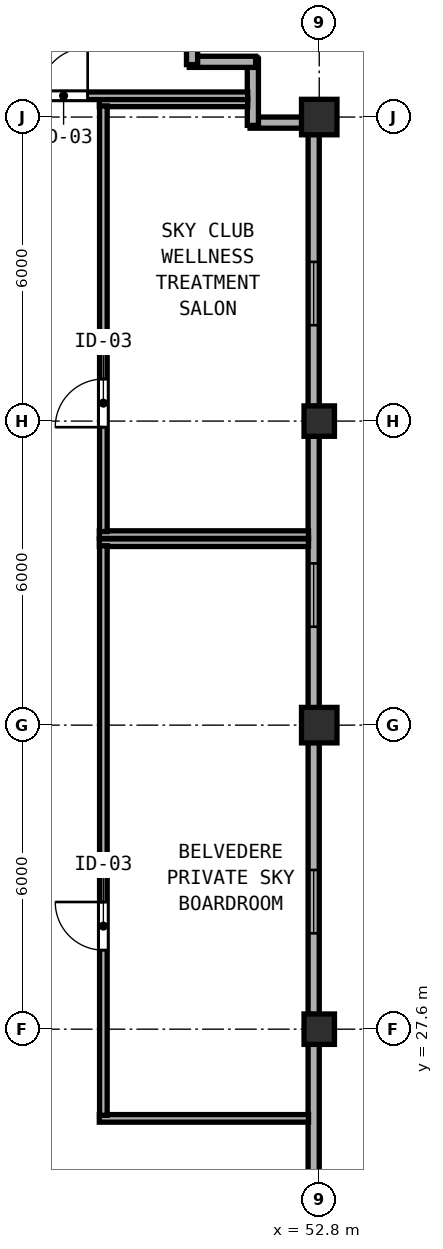
"""IFC4 building model, lengths in metres.
Left out: names, types, materials, properties, quantities, classifications, styles, units other than length and angle.
Written with IfcOpenShell. Run it as: python <this file> out.ifc"""

import sys

from ifc_helpers import new_model, si_unit, direction, frame, frame_2d, origin, origin_2d, place, context, subcontext, project, spatial, rectangle, hollow_rectangle, extrude, element, fill, save


model = new_model("IFC4")
c1 = context("Model", 3, precision=1e-05, world=origin(), true_north=direction((0.0, 1.0)))
c2 = subcontext(c1, "Body", "Model", "MODEL_VIEW")
j1 = project(units=[si_unit("LENGTHUNIT", "METRE"), si_unit("PLANEANGLEUNIT", "RADIAN")], contexts=[c1])
p1 = place(None, origin())
s1 = spatial("IfcSite", under=j1, at=p1, CompositionType="ELEMENT")
p2 = place(p1, origin())
s2 = spatial("IfcBuilding", under=s1, at=p2, CompositionType="ELEMENT")
p3 = place(p2, frame((0.0, 0.0, 305.6)))
s3 = spatial("IfcBuildingStorey", under=s2, at=p3, CompositionType="ELEMENT", Elevation=305.6)
for number, where, z_axis, x_axis in (
    (1, (52.8, 33.6, 0.0), (0.0, 0.0, 1.0), (1.0, 0.0, 0.0)),
    (2, (52.8, 45.6, 0.0), (0.0, 0.0, 1.0), (1.0, 0.0, 0.0)),
):
    element("IfcColumn", number, at=place(p3, frame(where, z_axis=z_axis, x_axis=x_axis)), inside=s3, PredefinedType="COLUMN", context=c2, shape_type="SweptSolid", body=[
        extrude(hollow_rectangle(XDim=0.7, YDim=0.7, WallThickness=0.026, at=origin_2d()), origin(), (0.0, 0.0, 1.0), 3.9),
    ])
for number, where, z_axis, x_axis in (
    (3, (52.8, 27.6, 0.0), (0.0, 0.0, 1.0), (1.0, 0.0, 0.0)),
    (4, (52.8, 39.6, 0.0), (0.0, 0.0, 1.0), (1.0, 0.0, 0.0)),
):
    element("IfcColumn", number, at=place(p3, frame(where, z_axis=z_axis, x_axis=x_axis)), inside=s3, PredefinedType="COLUMN", context=c2, shape_type="SweptSolid", body=[
        extrude(hollow_rectangle(XDim=0.6, YDim=0.6, WallThickness=0.024, at=origin_2d()), origin(), (0.0, 0.0, 1.0), 3.9),
    ])
p4 = place(p3, frame((52.69, 21.942, 0.0), z_axis=(0.0, 0.0, 1.0), x_axis=(0.0, 1.0, 0.0)))
e5 = element("IfcWall", 5, at=p4, inside=s3, PredefinedType="SOLIDWALL", context=c2, shape_type="SweptSolid", body=[
    extrude(rectangle(XDim=5.366, YDim=0.22, at=frame_2d((2.683, 0.0))), origin(), (0.0, 0.0, 1.0), 3.365),
])
p5 = place(p4, frame((0.973, 0.0, 0.85)))
e6 = element("IfcOpeningElement", 6, at=p5, cuts=e5, PredefinedType="OPENING", context=c2, shape_type="SweptSolid", body=[
    extrude(rectangle(XDim=1.25, YDim=1.95, at=frame_2d((0.625, 0.975))), frame((0.0, 0.12, 0.0), z_axis=(0.0, -1.0, 0.0), x_axis=(1.0, 0.0, 0.0)), (0.0, 0.0, 1.0), 0.24),
])
p6 = place(p3, frame((52.69, 27.892, 0.0), z_axis=(0.0, 0.0, 1.0), x_axis=(0.0, 1.0, 0.0)))
e7 = element("IfcWall", 7, at=p6, inside=s3, PredefinedType="SOLIDWALL", context=c2, shape_type="SweptSolid", body=[
    extrude(rectangle(XDim=5.366, YDim=0.22, at=frame_2d((2.683, 0.0))), origin(), (0.0, 0.0, 1.0), 3.365),
])
p7 = place(p6, frame((1.6, 0.0, 0.85)))
e8 = element("IfcOpeningElement", 8, at=p7, cuts=e7, PredefinedType="OPENING", context=c2, shape_type="SweptSolid", body=[
    extrude(rectangle(XDim=1.25, YDim=1.95, at=frame_2d((0.625, 0.975))), frame((0.0, 0.12, 0.0), z_axis=(0.0, -1.0, 0.0), x_axis=(1.0, 0.0, 0.0)), (0.0, 0.0, 1.0), 0.24),
])
p8 = place(p3, frame((52.69, 33.942, 0.0), z_axis=(0.0, 0.0, 1.0), x_axis=(0.0, 1.0, 0.0)))
e9 = element("IfcWall", 9, at=p8, inside=s3, PredefinedType="SOLIDWALL", context=c2, shape_type="SweptSolid", body=[
    extrude(rectangle(XDim=5.366, YDim=0.22, at=frame_2d((2.683, 0.0))), origin(), (0.0, 0.0, 1.0), 3.365),
])
p9 = place(p8, frame((1.6, 0.0, 0.85)))
e10 = element("IfcOpeningElement", 10, at=p9, cuts=e9, PredefinedType="OPENING", context=c2, shape_type="SweptSolid", body=[
    extrude(rectangle(XDim=1.25, YDim=1.95, at=frame_2d((0.625, 0.975))), frame((0.0, 0.12, 0.0), z_axis=(0.0, -1.0, 0.0), x_axis=(1.0, 0.0, 0.0)), (0.0, 0.0, 1.0), 0.24),
])
p10 = place(p3, frame((52.69, 39.892, 0.0), z_axis=(0.0, 0.0, 1.0), x_axis=(0.0, 1.0, 0.0)))
e11 = element("IfcWall", 11, at=p10, inside=s3, PredefinedType="SOLIDWALL", context=c2, shape_type="SweptSolid", body=[
    extrude(rectangle(XDim=5.366, YDim=0.22, at=frame_2d((2.683, 0.0))), origin(), (0.0, 0.0, 1.0), 3.365),
])
p11 = place(p10, frame((1.6, 0.0, 0.85)))
e12 = element("IfcOpeningElement", 12, at=p11, cuts=e11, PredefinedType="OPENING", context=c2, shape_type="SweptSolid", body=[
    extrude(rectangle(XDim=1.25, YDim=1.95, at=frame_2d((0.625, 0.975))), frame((0.0, 0.12, 0.0), z_axis=(0.0, -1.0, 0.0), x_axis=(1.0, 0.0, 0.0)), (0.0, 0.0, 1.0), 0.24),
])
p12 = place(p3, frame((52.458, 45.49, 0.0), z_axis=(0.0, 0.0, 1.0), x_axis=(-1.0, 0.0, 0.0)))
e13 = element("IfcWall", 13, at=p12, inside=s3, PredefinedType="SOLIDWALL", context=c2, shape_type="SweptSolid", body=[
    extrude(rectangle(XDim=1.023, YDim=0.22, at=frame_2d((0.511, 0.0))), origin(), (0.0, 0.0, 1.0), 3.72),
])
p13 = place(p3, frame((51.49, 45.435, 0.0), z_axis=(0.0, 0.0, 1.0), x_axis=(0.0, 1.0, 0.0)))
e14 = element("IfcWall", 14, at=p13, inside=s3, PredefinedType="SOLIDWALL", context=c2, shape_type="SweptSolid", body=[
    extrude(rectangle(XDim=1.31, YDim=0.22, at=frame_2d((0.655, 0.0))), origin(), (0.0, 0.0, 1.0), 3.72),
])
p14 = place(p3, frame((51.545, 46.69, 0.0), z_axis=(0.0, 0.0, 1.0), x_axis=(-1.0, 0.0, 0.0)))
e15 = element("IfcWall", 15, at=p14, inside=s3, PredefinedType="SOLIDWALL", context=c2, shape_type="SweptSolid", body=[
    extrude(rectangle(XDim=1.31, YDim=0.22, at=frame_2d((0.655, 0.0))), origin(), (0.0, 0.0, 1.0), 3.72),
])
p15 = place(p3, frame((50.29, 46.635, 0.0), z_axis=(0.0, 0.0, 1.0), x_axis=(0.0, 1.0, 0.0)))
e16 = element("IfcWall", 16, at=p15, inside=s3, PredefinedType="SOLIDWALL", context=c2, shape_type="SweptSolid", body=[
    extrude(rectangle(XDim=1.535, YDim=0.22, at=frame_2d((0.768, 0.0))), origin(), (0.0, 0.0, 1.0), 3.72),
])
for number, where, z_axis, x_axis in (
    (17, (48.46, 37.2, 0.0), (0.0, 0.0, 1.0), (1.0, 0.0, 0.0)),
    (18, (48.46, 25.84, 0.0), (0.0, 0.0, 1.0), (1.0, 0.0, 0.0)),
):
    element("IfcWall", number, at=place(p3, frame(where, z_axis=z_axis, x_axis=x_axis)), inside=s3, PredefinedType="PARTITIONING", context=c2, shape_type="SweptSolid", body=[
        extrude(rectangle(XDim=4.128, YDim=0.15, at=frame_2d((2.064, 0.0))), origin(), (0.0, 0.0, 1.0), 3.72),
    ])
p16 = place(p3, frame((48.54, 25.9, 0.0), z_axis=(0.0, 0.0, 1.0), x_axis=(0.0, 1.0, 0.0)))
e19 = element("IfcWall", 19, at=p16, inside=s3, PredefinedType="PARTITIONING", context=c2, shape_type="SweptSolid", body=[
    extrude(rectangle(XDim=11.24, YDim=0.15, at=frame_2d((5.62, 0.0))), origin(), (0.0, 0.0, 1.0), 3.72),
])
p17 = place(p16, frame((3.26, 0.0, 0.0)))
e20 = element("IfcOpeningElement", 20, at=p17, cuts=e19, PredefinedType="OPENING", context=c2, shape_type="SweptSolid", body=[
    extrude(rectangle(XDim=0.95, YDim=2.12, at=frame_2d((0.475, 1.06))), frame((0.0, 0.085, 0.0), z_axis=(0.0, -1.0, 0.0), x_axis=(1.0, 0.0, 0.0)), (0.0, 0.0, 1.0), 0.17),
])
p18 = place(p3, frame((48.46, 45.88, 0.0), z_axis=(0.0, 0.0, 1.0), x_axis=(1.0, 0.0, 0.0)))
e21 = element("IfcWall", 21, at=p18, inside=s3, PredefinedType="PARTITIONING", context=c2, shape_type="SweptSolid", body=[
    extrude(rectangle(XDim=2.928, YDim=0.15, at=frame_2d((1.464, 0.0))), origin(), (0.0, 0.0, 1.0), 3.72),
])
p19 = place(p3, frame((48.46, 37.36, 0.0), z_axis=(0.0, 0.0, 1.0), x_axis=(1.0, 0.0, 0.0)))
e22 = element("IfcWall", 22, at=p19, inside=s3, PredefinedType="PARTITIONING", context=c2, shape_type="SweptSolid", body=[
    extrude(rectangle(XDim=4.128, YDim=0.15, at=frame_2d((2.064, 0.0))), origin(), (0.0, 0.0, 1.0), 3.72),
])
p20 = place(p3, frame((48.54, 37.42, 0.0), z_axis=(0.0, 0.0, 1.0), x_axis=(0.0, 1.0, 0.0)))
e23 = element("IfcWall", 23, at=p20, inside=s3, PredefinedType="PARTITIONING", context=c2, shape_type="SweptSolid", body=[
    extrude(rectangle(XDim=8.4, YDim=0.15, at=frame_2d((4.2, 0.0))), origin(), (0.0, 0.0, 1.0), 3.72),
])
p21 = place(p20, frame((2.06, 0.0, 0.0)))
e24 = element("IfcOpeningElement", 24, at=p21, cuts=e23, PredefinedType="OPENING", context=c2, shape_type="SweptSolid", body=[
    extrude(rectangle(XDim=0.95, YDim=2.12, at=frame_2d((0.475, 1.06))), frame((0.0, 0.085, 0.0), z_axis=(0.0, -1.0, 0.0), x_axis=(1.0, 0.0, 0.0)), (0.0, 0.0, 1.0), 0.17),
])
p22 = place(p3, frame((45.385, 46.02, 0.0), z_axis=(0.0, 0.0, 1.0), x_axis=(1.0, 0.0, 0.0)))
e25 = element("IfcWall", 25, at=p22, inside=s3, PredefinedType="PARTITIONING", context=c2, shape_type="SweptSolid", body=[
    extrude(rectangle(XDim=6.003, YDim=0.15, at=frame_2d((3.001, 0.0))), origin(), (0.0, 0.0, 1.0), 3.72),
])
p23 = place(p22, frame((1.895, 0.0, 0.0)))
e26 = element("IfcOpeningElement", 26, at=p23, cuts=e25, PredefinedType="OPENING", context=c2, shape_type="SweptSolid", body=[
    extrude(rectangle(XDim=0.95, YDim=2.12, at=frame_2d((0.475, 1.06))), frame((0.0, 0.085, 0.0), z_axis=(0.0, -1.0, 0.0), x_axis=(1.0, 0.0, 0.0)), (0.0, 0.0, 1.0), 0.17),
])
p24 = place(p7, origin())
e27 = element("IfcWindow", 27, at=p24, inside=s3, PartitioningType="SINGLE_PANEL", PredefinedType="WINDOW", context=c2, shape_type="SweptSolid", body=[
    extrude(rectangle(XDim=1.25, YDim=1.95, at=frame_2d((0.625, 0.975))), frame((0.0, 0.03, 0.0), z_axis=(0.0, -1.0, 0.0), x_axis=(1.0, 0.0, 0.0)), (0.0, 0.0, 1.0), 0.06),
])
fill(e8, e27)
p25 = place(p9, origin())
e28 = element("IfcWindow", 28, at=p25, inside=s3, PartitioningType="SINGLE_PANEL", PredefinedType="WINDOW", context=c2, shape_type="SweptSolid", body=[
    extrude(rectangle(XDim=1.25, YDim=1.95, at=frame_2d((0.625, 0.975))), frame((0.0, 0.03, 0.0), z_axis=(0.0, -1.0, 0.0), x_axis=(1.0, 0.0, 0.0)), (0.0, 0.0, 1.0), 0.06),
])
fill(e10, e28)
p26 = place(p11, origin())
e29 = element("IfcWindow", 29, at=p26, inside=s3, PartitioningType="SINGLE_PANEL", PredefinedType="WINDOW", context=c2, shape_type="SweptSolid", body=[
    extrude(rectangle(XDim=1.25, YDim=1.95, at=frame_2d((0.625, 0.975))), frame((0.0, 0.03, 0.0), z_axis=(0.0, -1.0, 0.0), x_axis=(1.0, 0.0, 0.0)), (0.0, 0.0, 1.0), 0.06),
])
fill(e12, e29)
p27 = place(p17, origin())
e30 = element("IfcDoor", 30, at=p27, inside=s3, OperationType="SINGLE_SWING_RIGHT", PredefinedType="DOOR", context=c2, shape_type="SweptSolid", body=[
    extrude(rectangle(XDim=0.95, YDim=2.12, at=frame_2d((0.475, 1.06))), frame((0.0, 0.025, 0.0), z_axis=(0.0, -1.0, 0.0), x_axis=(1.0, 0.0, 0.0)), (0.0, 0.0, 1.0), 0.05),
])
fill(e20, e30)
p28 = place(p21, origin())
e31 = element("IfcDoor", 31, at=p28, inside=s3, OperationType="SINGLE_SWING_LEFT", PredefinedType="DOOR", context=c2, shape_type="SweptSolid", body=[
    extrude(rectangle(XDim=0.95, YDim=2.12, at=frame_2d((0.475, 1.06))), frame((0.0, 0.025, 0.0), z_axis=(0.0, -1.0, 0.0), x_axis=(1.0, 0.0, 0.0)), (0.0, 0.0, 1.0), 0.05),
])
fill(e24, e31)
p29 = place(p23, origin())
e32 = element("IfcDoor", 32, at=p29, inside=s3, OperationType="SINGLE_SWING_RIGHT", PredefinedType="DOOR", context=c2, shape_type="SweptSolid", body=[
    extrude(rectangle(XDim=0.95, YDim=2.12, at=frame_2d((0.475, 1.06))), frame((0.0, 0.025, 0.0), z_axis=(0.0, -1.0, 0.0), x_axis=(1.0, 0.0, 0.0)), (0.0, 0.0, 1.0), 0.05),
])
fill(e26, e32)
save(model, sys.argv[1])
